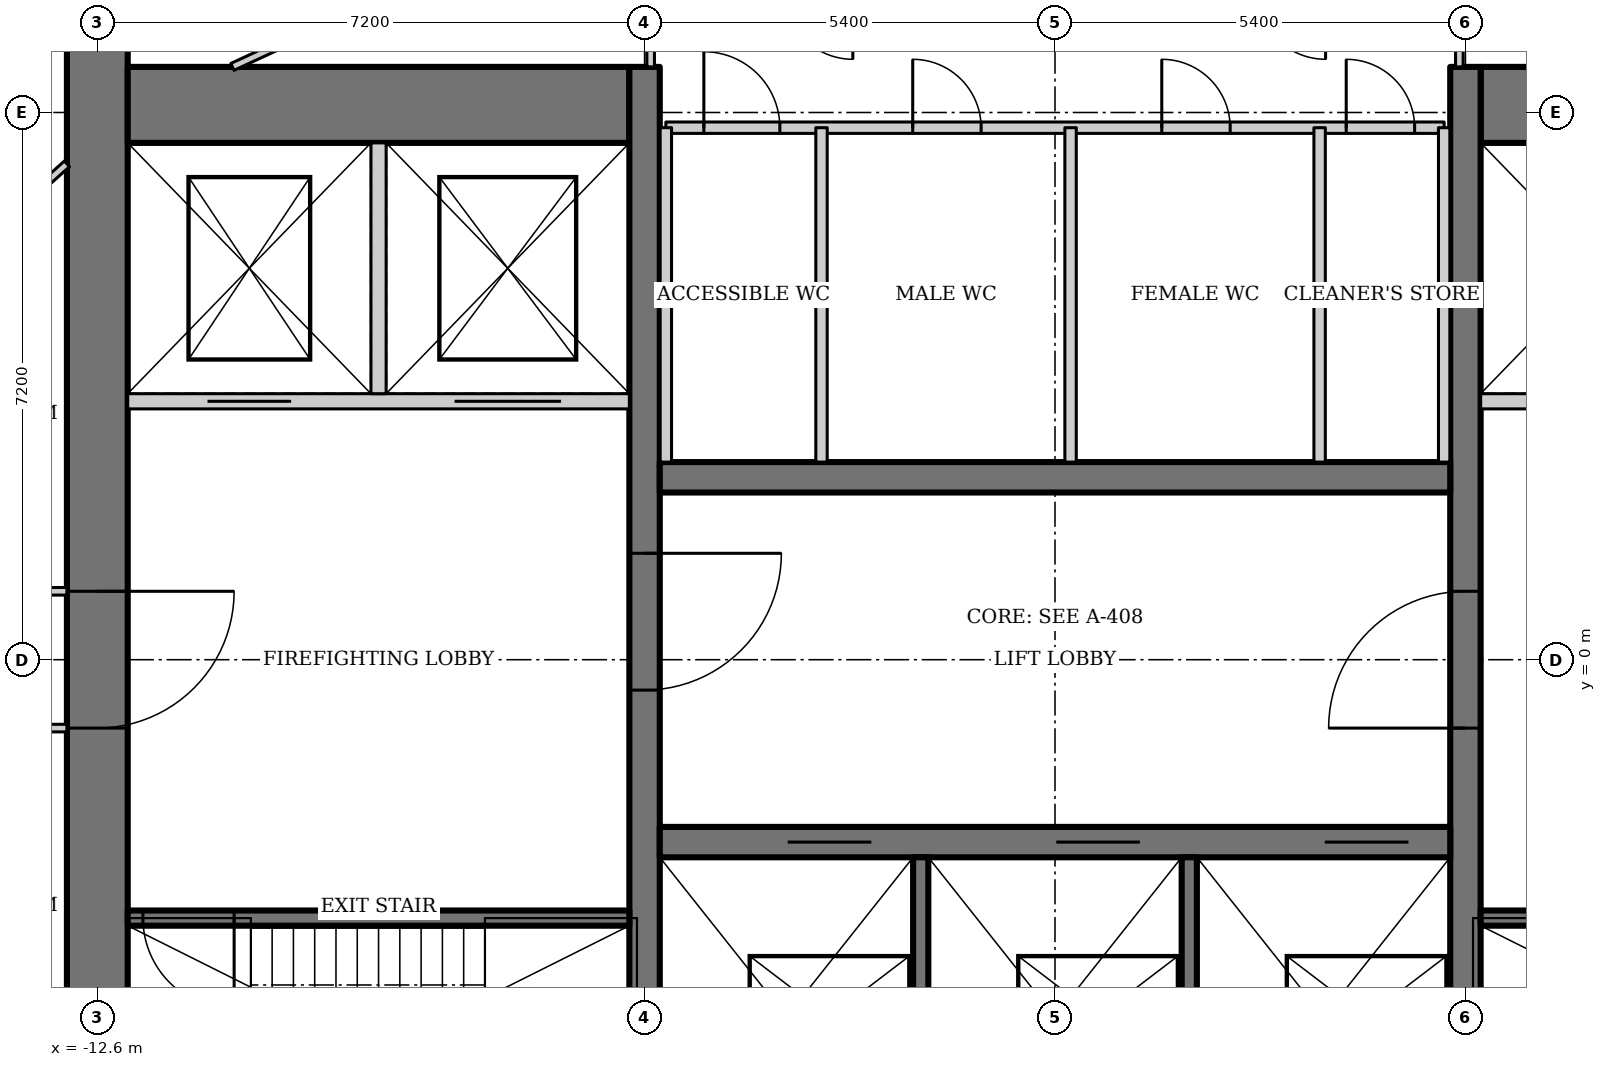
"""IFC4 building model, lengths in metres.
Left out: names, types, materials, properties, quantities, classifications, styles, units other than length and angle.
Written with IfcOpenShell. Run it as: python <this file> out.ifc"""

import sys

from ifc_helpers import new_model, si_unit, direction, frame, frame_2d, origin, place, context, subcontext, project, spatial, rectangle, extrude, element, fill, save


model = new_model("IFC4")
c1 = context("Model", 3, precision=1e-05, world=origin(), true_north=direction((0.0, 1.0)))
c2 = subcontext(c1, "Body", "Model", "MODEL_VIEW")
j1 = project(units=[si_unit("LENGTHUNIT", "METRE"), si_unit("PLANEANGLEUNIT", "RADIAN")], contexts=[c1])
p1 = place(None, origin())
s1 = spatial("IfcSite", under=j1, at=p1, CompositionType="ELEMENT")
p2 = place(p1, origin())
s2 = spatial("IfcBuilding", under=s1, at=p2, CompositionType="ELEMENT")
p3 = place(p2, frame((0.0, 0.0, 215.8)))
s3 = spatial("IfcBuildingStorey", under=s2, at=p3, CompositionType="ELEMENT", Elevation=215.8)
p4 = place(p3, frame((-12.6, 13.0, 0.0), z_axis=(0.0, 0.0, 1.0), x_axis=(0.0, -1.0, 0.0)))
e1 = element("IfcWall", 1, at=p4, inside=s3, PredefinedType="SHEAR", context=c2, shape_type="SweptSolid", body=[
    extrude(rectangle(XDim=26.0, YDim=0.8, at=frame_2d((13.0, 0.0))), origin(), (0.0, 0.0, 1.0), 4.2),
])
p5 = place(p4, frame((12.1, 0.0, 0.0)))
e2 = element("IfcOpeningElement", 2, at=p5, cuts=e1, PredefinedType="OPENING", context=c2, shape_type="SweptSolid", body=[
    extrude(rectangle(XDim=1.8, YDim=2.1, at=frame_2d((0.9, 1.05))), frame((0.0, 0.41, 0.0), z_axis=(0.0, -1.0, 0.0), x_axis=(1.0, 0.0, 0.0)), (0.0, 0.0, 1.0), 0.82),
])
for number, where, z_axis, x_axis in (
    (3, (12.2, 7.3, 0.0), (0.0, 0.0, 1.0), (-1.0, 0.0, 0.0)),
    (4, (-5.6, 7.3, 0.0), (0.0, 0.0, 1.0), (-1.0, 0.0, 0.0)),
):
    element("IfcWall", number, at=place(p3, frame(where, z_axis=z_axis, x_axis=x_axis)), inside=s3, PredefinedType="SHEAR", context=c2, shape_type="SweptSolid", body=[
        extrude(rectangle(XDim=6.6, YDim=1.0, at=frame_2d((3.3, 0.0))), origin(), (0.0, 0.0, 1.0), 4.2),
    ])
p6 = place(p3, frame((5.4, -6.8, 0.0), z_axis=(0.0, 0.0, 1.0), x_axis=(0.0, 1.0, 0.0)))
e5 = element("IfcWall", 5, at=p6, inside=s3, PredefinedType="SHEAR", context=c2, shape_type="SweptSolid", body=[
    extrude(rectangle(XDim=14.6, YDim=0.4, at=frame_2d((7.3, 0.0))), origin(), (0.0, 0.0, 1.0), 4.2),
])
p7 = place(p6, frame((5.9, 0.0, 0.0)))
e6 = element("IfcOpeningElement", 6, at=p7, cuts=e5, PredefinedType="OPENING", context=c2, shape_type="SweptSolid", body=[
    extrude(rectangle(XDim=1.8, YDim=2.1, at=frame_2d((0.9, 1.05))), frame((0.0, 0.21, 0.0), z_axis=(0.0, -1.0, 0.0), x_axis=(1.0, 0.0, 0.0)), (0.0, 0.0, 1.0), 0.42),
])
p8 = place(p3, frame((-5.4, 7.8, 0.0), z_axis=(0.0, 0.0, 1.0), x_axis=(0.0, -1.0, 0.0)))
e7 = element("IfcWall", 7, at=p8, inside=s3, PredefinedType="SHEAR", context=c2, shape_type="SweptSolid", body=[
    extrude(rectangle(XDim=14.6, YDim=0.4, at=frame_2d((7.3, 0.0))), origin(), (0.0, 0.0, 1.0), 4.2),
])
p9 = place(p8, frame((6.4, 0.0, 0.0)))
e8 = element("IfcOpeningElement", 8, at=p9, cuts=e7, PredefinedType="OPENING", context=c2, shape_type="SweptSolid", body=[
    extrude(rectangle(XDim=1.8, YDim=2.1, at=frame_2d((0.9, 1.05))), frame((0.0, 0.21, 0.0), z_axis=(0.0, -1.0, 0.0), x_axis=(1.0, 0.0, 0.0)), (0.0, 0.0, 1.0), 0.42),
])
p10 = place(p3, frame((-5.2, -2.4, 0.0), z_axis=(0.0, 0.0, 1.0), x_axis=(1.0, 0.0, 0.0)))
e9 = element("IfcWall", 9, at=p10, inside=s3, PredefinedType="SHEAR", context=c2, shape_type="SweptSolid", body=[
    extrude(rectangle(XDim=10.4, YDim=0.4, at=frame_2d((5.2, 0.0))), origin(), (0.0, 0.0, 1.0), 4.2),
])
p11 = place(p10, frame((1.683, 0.0, 0.0)))
e10 = element("IfcOpeningElement", 10, at=p11, cuts=e9, PredefinedType="OPENING", context=c2, shape_type="SweptSolid", body=[
    extrude(rectangle(XDim=1.1, YDim=2.2, at=frame_2d((0.55, 1.1))), frame((0.0, 0.21, 0.0), z_axis=(0.0, -1.0, 0.0), x_axis=(1.0, 0.0, 0.0)), (0.0, 0.0, 1.0), 0.42),
])
p12 = place(p10, frame((5.217, 0.0, 0.0)))
e11 = element("IfcOpeningElement", 11, at=p12, cuts=e9, PredefinedType="OPENING", context=c2, shape_type="SweptSolid", body=[
    extrude(rectangle(XDim=1.1, YDim=2.2, at=frame_2d((0.55, 1.1))), frame((0.0, 0.21, 0.0), z_axis=(0.0, -1.0, 0.0), x_axis=(1.0, 0.0, 0.0)), (0.0, 0.0, 1.0), 0.42),
])
p13 = place(p10, frame((8.75, 0.0, 0.0)))
e12 = element("IfcOpeningElement", 12, at=p13, cuts=e9, PredefinedType="OPENING", context=c2, shape_type="SweptSolid", body=[
    extrude(rectangle(XDim=1.1, YDim=2.2, at=frame_2d((0.55, 1.1))), frame((0.0, 0.21, 0.0), z_axis=(0.0, -1.0, 0.0), x_axis=(1.0, 0.0, 0.0)), (0.0, 0.0, 1.0), 0.42),
])
for number, where, z_axis, x_axis in (
    (13, (-1.767, -2.6, 0.0), (0.0, 0.0, 1.0), (0.0, -1.0, 0.0)),
    (14, (1.767, -2.6, 0.0), (0.0, 0.0, 1.0), (0.0, -1.0, 0.0)),
):
    element("IfcWall", number, at=place(p3, frame(where, z_axis=z_axis, x_axis=x_axis)), inside=s3, PredefinedType="SOLIDWALL", context=c2, shape_type="SweptSolid", body=[
        extrude(rectangle(XDim=4.2, YDim=0.2, at=frame_2d((2.1, 0.0))), origin(), (0.0, 0.0, 1.0), 4.2),
    ])
p14 = place(p3, frame((5.2, 2.4, 0.0), z_axis=(0.0, 0.0, 1.0), x_axis=(-1.0, 0.0, 0.0)))
e15 = element("IfcWall", 15, at=p14, inside=s3, PredefinedType="SHEAR", context=c2, shape_type="SweptSolid", body=[
    extrude(rectangle(XDim=10.4, YDim=0.4, at=frame_2d((5.2, 0.0))), origin(), (0.0, 0.0, 1.0), 4.2),
])
p15 = place(p3, frame((5.6, -3.4, 0.0), z_axis=(0.0, 0.0, 1.0), x_axis=(1.0, 0.0, 0.0)))
e16 = element("IfcWall", 16, at=p15, inside=s3, PredefinedType="SHEAR", context=c2, shape_type="SweptSolid", body=[
    extrude(rectangle(XDim=6.6, YDim=0.2, at=frame_2d((3.3, 0.0))), origin(), (0.0, 0.0, 1.0), 4.2),
])
p16 = place(p15, frame((5.2, 0.0, 0.0)))
e17 = element("IfcOpeningElement", 17, at=p16, cuts=e16, PredefinedType="OPENING", context=c2, shape_type="SweptSolid", body=[
    extrude(rectangle(XDim=1.2, YDim=2.1, at=frame_2d((0.6, 1.05))), frame((0.0, 0.11, 0.0), z_axis=(0.0, -1.0, 0.0), x_axis=(1.0, 0.0, 0.0)), (0.0, 0.0, 1.0), 0.22),
])
p17 = place(p3, frame((12.2, 3.4, 0.0), z_axis=(0.0, 0.0, 1.0), x_axis=(-1.0, 0.0, 0.0)))
e18 = element("IfcWall", 18, at=p17, inside=s3, PredefinedType="SOLIDWALL", context=c2, shape_type="SweptSolid", body=[
    extrude(rectangle(XDim=6.6, YDim=0.2, at=frame_2d((3.3, 0.0))), origin(), (0.0, 0.0, 1.0), 4.2),
])
p18 = place(p17, frame((4.45, 0.0, 0.0)))
e19 = element("IfcOpeningElement", 19, at=p18, cuts=e18, PredefinedType="OPENING", context=c2, shape_type="SweptSolid", body=[
    extrude(rectangle(XDim=1.1, YDim=2.2, at=frame_2d((0.55, 1.1))), frame((0.0, 0.11, 0.0), z_axis=(0.0, -1.0, 0.0), x_axis=(1.0, 0.0, 0.0)), (0.0, 0.0, 1.0), 0.22),
])
p19 = place(p17, frame((0.9, 0.0, 0.0)))
e20 = element("IfcOpeningElement", 20, at=p19, cuts=e18, PredefinedType="OPENING", context=c2, shape_type="SweptSolid", body=[
    extrude(rectangle(XDim=1.4, YDim=2.2, at=frame_2d((0.7, 1.1))), frame((0.0, 0.11, 0.0), z_axis=(0.0, -1.0, 0.0), x_axis=(1.0, 0.0, 0.0)), (0.0, 0.0, 1.0), 0.22),
])
p20 = place(p3, frame((-5.6, -3.4, 0.0), z_axis=(0.0, 0.0, 1.0), x_axis=(-1.0, 0.0, 0.0)))
e21 = element("IfcWall", 21, at=p20, inside=s3, PredefinedType="SHEAR", context=c2, shape_type="SweptSolid", body=[
    extrude(rectangle(XDim=6.6, YDim=0.2, at=frame_2d((3.3, 0.0))), origin(), (0.0, 0.0, 1.0), 4.2),
])
p21 = place(p20, frame((5.2, 0.0, 0.0)))
e22 = element("IfcOpeningElement", 22, at=p21, cuts=e21, PredefinedType="OPENING", context=c2, shape_type="SweptSolid", body=[
    extrude(rectangle(XDim=1.2, YDim=2.1, at=frame_2d((0.6, 1.05))), frame((0.0, 0.11, 0.0), z_axis=(0.0, -1.0, 0.0), x_axis=(1.0, 0.0, 0.0)), (0.0, 0.0, 1.0), 0.22),
])
p22 = place(p3, frame((-12.2, 3.4, 0.0), z_axis=(0.0, 0.0, 1.0), x_axis=(1.0, 0.0, 0.0)))
e23 = element("IfcWall", 23, at=p22, inside=s3, PredefinedType="SOLIDWALL", context=c2, shape_type="SweptSolid", body=[
    extrude(rectangle(XDim=6.6, YDim=0.2, at=frame_2d((3.3, 0.0))), origin(), (0.0, 0.0, 1.0), 4.2),
])
p23 = place(p22, frame((1.05, 0.0, 0.0)))
e24 = element("IfcOpeningElement", 24, at=p23, cuts=e23, PredefinedType="OPENING", context=c2, shape_type="SweptSolid", body=[
    extrude(rectangle(XDim=1.1, YDim=2.2, at=frame_2d((0.55, 1.1))), frame((0.0, 0.11, 0.0), z_axis=(0.0, -1.0, 0.0), x_axis=(1.0, 0.0, 0.0)), (0.0, 0.0, 1.0), 0.22),
])
p24 = place(p22, frame((4.3, 0.0, 0.0)))
e25 = element("IfcOpeningElement", 25, at=p24, cuts=e23, PredefinedType="OPENING", context=c2, shape_type="SweptSolid", body=[
    extrude(rectangle(XDim=1.4, YDim=2.2, at=frame_2d((0.7, 1.1))), frame((0.0, 0.11, 0.0), z_axis=(0.0, -1.0, 0.0), x_axis=(1.0, 0.0, 0.0)), (0.0, 0.0, 1.0), 0.22),
])
p25 = place(p3, frame((-8.9, 3.5, 0.0), z_axis=(0.0, 0.0, 1.0), x_axis=(0.0, 1.0, 0.0)))
e26 = element("IfcWall", 26, at=p25, inside=s3, PredefinedType="SOLIDWALL", context=c2, shape_type="SweptSolid", body=[
    extrude(rectangle(XDim=3.3, YDim=0.2, at=frame_2d((1.65, 0.0))), origin(), (0.0, 0.0, 1.0), 4.2),
])
p26 = place(p3, frame((-9.893, 10.245, 0.0), z_axis=(0.0, 0.0, 1.0), x_axis=(-0.886174439647, -0.463351769735, 0.0)))
e27 = element("IfcWall", 27, at=p26, inside=s3, PredefinedType="PARTITIONING", context=c2, shape_type="SweptSolid", body=[
    extrude(rectangle(XDim=4.735, YDim=0.15, at=frame_2d((2.367, 0.0))), origin(), (0.0, 0.0, 1.0), 4.05),
])
p27 = place(p3, frame((-5.12, 7.0, 0.0), z_axis=(0.0, 0.0, 1.0), x_axis=(1.0, 0.0, 0.0)))
e28 = element("IfcWall", 28, at=p27, inside=s3, PredefinedType="SOLIDWALL", context=c2, shape_type="SweptSolid", body=[
    extrude(rectangle(XDim=10.24, YDim=0.15, at=frame_2d((5.12, 0.0))), origin(), (0.0, 0.0, 1.0), 4.05),
])
p28 = place(p27, frame((0.5, 0.0, 0.0)))
e29 = element("IfcOpeningElement", 29, at=p28, cuts=e28, PredefinedType="OPENING", context=c2, shape_type="SweptSolid", body=[
    extrude(rectangle(XDim=1.0, YDim=2.1, at=frame_2d((0.5, 1.05))), frame((0.0, 0.085, 0.0), z_axis=(0.0, -1.0, 0.0), x_axis=(1.0, 0.0, 0.0)), (0.0, 0.0, 1.0), 0.17),
])
p29 = place(p27, frame((3.248, 0.0, 0.0)))
e30 = element("IfcOpeningElement", 30, at=p29, cuts=e28, PredefinedType="OPENING", context=c2, shape_type="SweptSolid", body=[
    extrude(rectangle(XDim=0.9, YDim=2.1, at=frame_2d((0.45, 1.05))), frame((0.0, 0.085, 0.0), z_axis=(0.0, -1.0, 0.0), x_axis=(1.0, 0.0, 0.0)), (0.0, 0.0, 1.0), 0.17),
])
p30 = place(p27, frame((6.525, 0.0, 0.0)))
e31 = element("IfcOpeningElement", 31, at=p30, cuts=e28, PredefinedType="OPENING", context=c2, shape_type="SweptSolid", body=[
    extrude(rectangle(XDim=0.9, YDim=2.1, at=frame_2d((0.45, 1.05))), frame((0.0, 0.085, 0.0), z_axis=(0.0, -1.0, 0.0), x_axis=(1.0, 0.0, 0.0)), (0.0, 0.0, 1.0), 0.17),
])
p31 = place(p27, frame((8.952, 0.0, 0.0)))
e32 = element("IfcOpeningElement", 32, at=p31, cuts=e28, PredefinedType="OPENING", context=c2, shape_type="SweptSolid", body=[
    extrude(rectangle(XDim=0.9, YDim=2.1, at=frame_2d((0.45, 1.05))), frame((0.0, 0.085, 0.0), z_axis=(0.0, -1.0, 0.0), x_axis=(1.0, 0.0, 0.0)), (0.0, 0.0, 1.0), 0.17),
])
for number, where, z_axis, x_axis in (
    (33, (-5.12, 2.6, 0.0), (0.0, 0.0, 1.0), (0.0, 1.0, 0.0)),
    (34, (5.12, 2.6, 0.0), (0.0, 0.0, 1.0), (0.0, 1.0, 0.0)),
    (35, (-3.072, 2.6, 0.0), (0.0, 0.0, 1.0), (0.0, 1.0, 0.0)),
    (36, (0.205, 2.6, 0.0), (0.0, 0.0, 1.0), (0.0, 1.0, 0.0)),
    (37, (3.482, 2.6, 0.0), (0.0, 0.0, 1.0), (0.0, 1.0, 0.0)),
):
    element("IfcWall", number, at=place(p3, frame(where, z_axis=z_axis, x_axis=x_axis)), inside=s3, PredefinedType="SOLIDWALL", context=c2, shape_type="SweptSolid", body=[
        extrude(rectangle(XDim=4.4, YDim=0.15, at=frame_2d((2.2, 0.0))), origin(), (0.0, 0.0, 1.0), 4.05),
    ])
p32 = place(p3, frame((-13.0, -6.524, 0.0), z_axis=(0.0, 0.0, 1.0), x_axis=(-0.743177243228, 0.669094601046, 0.0)))
e38 = element("IfcWall", 38, at=p32, inside=s3, PredefinedType="PARTITIONING", context=c2, shape_type="SweptSolid", body=[
    extrude(rectangle(XDim=3.843, YDim=0.1, at=frame_2d((1.921, 0.0))), origin(), (0.0, 0.0, 1.0), 4.05),
])
p33 = place(p3, frame((5.32, 7.8, 0.0), z_axis=(0.0, 0.0, 1.0), x_axis=(0.0, 1.0, 0.0)))
e39 = element("IfcWall", 39, at=p33, inside=s3, PredefinedType="PARTITIONING", context=c2, shape_type="SweptSolid", body=[
    extrude(rectangle(XDim=1.0, YDim=0.1, at=frame_2d((0.5, 0.0))), origin(), (0.0, 0.0, 1.0), 4.05),
])
p34 = place(p3, frame((-10.823, 7.8, 0.0), z_axis=(0.0, 0.0, 1.0), x_axis=(0.907759689292, 0.419490579748, 0.0)))
e40 = element("IfcWall", 40, at=p34, inside=s3, PredefinedType="PARTITIONING", context=c2, shape_type="SweptSolid", body=[
    extrude(rectangle(XDim=2.506, YDim=0.1, at=frame_2d((1.253, 0.0))), origin(), (0.0, 0.0, 1.0), 4.05),
])
p35 = place(p3, frame((-5.32, 8.8, 0.0), z_axis=(0.0, 0.0, 1.0), x_axis=(0.0, -1.0, 0.0)))
e41 = element("IfcWall", 41, at=p35, inside=s3, PredefinedType="PARTITIONING", context=c2, shape_type="SweptSolid", body=[
    extrude(rectangle(XDim=1.0, YDim=0.1, at=frame_2d((0.5, 0.0))), origin(), (0.0, 0.0, 1.0), 4.05),
])
p36 = place(p3, frame((-15.856, 3.953, 0.0), z_axis=(0.0, 0.0, 1.0), x_axis=(0.743177243228, 0.669094601046, 0.0)))
e42 = element("IfcWall", 42, at=p36, inside=s3, PredefinedType="PARTITIONING", context=c2, shape_type="SweptSolid", body=[
    extrude(rectangle(XDim=3.843, YDim=0.1, at=frame_2d((1.921, 0.0))), origin(), (0.0, 0.0, 1.0), 4.05),
])
p37 = place(p3, frame((-15.165, -0.9, 0.0), z_axis=(0.0, 0.0, 1.0), x_axis=(1.0, 0.0, 0.0)))
e43 = element("IfcWall", 43, at=p37, inside=s3, PredefinedType="PARTITIONING", context=c2, shape_type="SweptSolid", body=[
    extrude(rectangle(XDim=2.165, YDim=0.1, at=frame_2d((1.083, 0.0))), origin(), (0.0, 0.0, 1.0), 4.05),
])
p38 = place(p37, frame((0.1, 0.0, 0.0)))
e44 = element("IfcOpeningElement", 44, at=p38, cuts=e43, PredefinedType="OPENING", context=c2, shape_type="SweptSolid", body=[
    extrude(rectangle(XDim=0.9, YDim=2.1, at=frame_2d((0.45, 1.05))), frame((0.0, 0.06, 0.0), z_axis=(0.0, -1.0, 0.0), x_axis=(1.0, 0.0, 0.0)), (0.0, 0.0, 1.0), 0.12),
])
p39 = place(p3, frame((-13.0, 0.9, 0.0), z_axis=(0.0, 0.0, 1.0), x_axis=(-1.0, 0.0, 0.0)))
e45 = element("IfcWall", 45, at=p39, inside=s3, PredefinedType="PARTITIONING", context=c2, shape_type="SweptSolid", body=[
    extrude(rectangle(XDim=2.165, YDim=0.1, at=frame_2d((1.083, 0.0))), origin(), (0.0, 0.0, 1.0), 4.05),
])
p40 = place(p39, frame((1.15, 0.0, 0.0)))
e46 = element("IfcOpeningElement", 46, at=p40, cuts=e45, PredefinedType="OPENING", context=c2, shape_type="SweptSolid", body=[
    extrude(rectangle(XDim=0.9, YDim=2.1, at=frame_2d((0.45, 1.05))), frame((0.0, 0.06, 0.0), z_axis=(0.0, -1.0, 0.0), x_axis=(1.0, 0.0, 0.0)), (0.0, 0.0, 1.0), 0.12),
])
p41 = place(p7, origin())
e47 = element("IfcDoor", 47, at=p41, inside=s3, OperationType="DOUBLE_DOOR_DOUBLE_SWING", PredefinedType="DOOR", context=c2, shape_type="SweptSolid", body=[
    extrude(rectangle(XDim=1.8, YDim=2.1, at=frame_2d((0.9, 1.05))), frame((0.0, 0.025, 0.0), z_axis=(0.0, -1.0, 0.0), x_axis=(1.0, 0.0, 0.0)), (0.0, 0.0, 1.0), 0.05),
])
fill(e6, e47)
p42 = place(p9, origin())
e48 = element("IfcDoor", 48, at=p42, inside=s3, OperationType="DOUBLE_DOOR_DOUBLE_SWING", PredefinedType="DOOR", context=c2, shape_type="SweptSolid", body=[
    extrude(rectangle(XDim=1.8, YDim=2.1, at=frame_2d((0.9, 1.05))), frame((0.0, 0.025, 0.0), z_axis=(0.0, -1.0, 0.0), x_axis=(1.0, 0.0, 0.0)), (0.0, 0.0, 1.0), 0.05),
])
fill(e8, e48)
p43 = place(p21, origin())
e49 = element("IfcDoor", 49, at=p43, inside=s3, OperationType="SINGLE_SWING_RIGHT", PredefinedType="DOOR", context=c2, shape_type="SweptSolid", body=[
    extrude(rectangle(XDim=1.2, YDim=2.1, at=frame_2d((0.6, 1.05))), frame((0.0, 0.025, 0.0), z_axis=(0.0, -1.0, 0.0), x_axis=(1.0, 0.0, 0.0)), (0.0, 0.0, 1.0), 0.05),
])
fill(e22, e49)
p44 = place(p5, origin())
e50 = element("IfcDoor", 50, at=p44, inside=s3, OperationType="DOUBLE_DOOR_DOUBLE_SWING", PredefinedType="DOOR", context=c2, shape_type="SweptSolid", body=[
    extrude(rectangle(XDim=1.8, YDim=2.1, at=frame_2d((0.9, 1.05))), frame((0.0, 0.025, 0.0), z_axis=(0.0, -1.0, 0.0), x_axis=(1.0, 0.0, 0.0)), (0.0, 0.0, 1.0), 0.05),
])
fill(e2, e50)
p45 = place(p11, origin())
e51 = element("IfcDoor", 51, at=p45, inside=s3, OperationType="DOUBLE_DOOR_SLIDING", PredefinedType="DOOR", context=c2, shape_type="SweptSolid", body=[
    extrude(rectangle(XDim=1.1, YDim=2.2, at=frame_2d((0.55, 1.1))), frame((0.0, 0.025, 0.0), z_axis=(0.0, -1.0, 0.0), x_axis=(1.0, 0.0, 0.0)), (0.0, 0.0, 1.0), 0.05),
])
fill(e10, e51)
p46 = place(p12, origin())
e52 = element("IfcDoor", 52, at=p46, inside=s3, OperationType="DOUBLE_DOOR_SLIDING", PredefinedType="DOOR", context=c2, shape_type="SweptSolid", body=[
    extrude(rectangle(XDim=1.1, YDim=2.2, at=frame_2d((0.55, 1.1))), frame((0.0, 0.025, 0.0), z_axis=(0.0, -1.0, 0.0), x_axis=(1.0, 0.0, 0.0)), (0.0, 0.0, 1.0), 0.05),
])
fill(e11, e52)
p47 = place(p13, origin())
e53 = element("IfcDoor", 53, at=p47, inside=s3, OperationType="DOUBLE_DOOR_SLIDING", PredefinedType="DOOR", context=c2, shape_type="SweptSolid", body=[
    extrude(rectangle(XDim=1.1, YDim=2.2, at=frame_2d((0.55, 1.1))), frame((0.0, 0.025, 0.0), z_axis=(0.0, -1.0, 0.0), x_axis=(1.0, 0.0, 0.0)), (0.0, 0.0, 1.0), 0.05),
])
fill(e12, e53)
p48 = place(p23, origin())
e54 = element("IfcDoor", 54, at=p48, inside=s3, OperationType="DOUBLE_DOOR_SLIDING", PredefinedType="DOOR", context=c2, shape_type="SweptSolid", body=[
    extrude(rectangle(XDim=1.1, YDim=2.2, at=frame_2d((0.55, 1.1))), frame((0.0, 0.025, 0.0), z_axis=(0.0, -1.0, 0.0), x_axis=(1.0, 0.0, 0.0)), (0.0, 0.0, 1.0), 0.05),
])
fill(e24, e54)
p49 = place(p24, origin())
e55 = element("IfcDoor", 55, at=p49, inside=s3, OperationType="DOUBLE_DOOR_SLIDING", PredefinedType="DOOR", context=c2, shape_type="SweptSolid", body=[
    extrude(rectangle(XDim=1.4, YDim=2.2, at=frame_2d((0.7, 1.1))), frame((0.0, 0.025, 0.0), z_axis=(0.0, -1.0, 0.0), x_axis=(1.0, 0.0, 0.0)), (0.0, 0.0, 1.0), 0.05),
])
fill(e25, e55)
p50 = place(p28, origin())
e56 = element("IfcDoor", 56, at=p50, inside=s3, OperationType="SINGLE_SWING_LEFT", PredefinedType="DOOR", context=c2, shape_type="SweptSolid", body=[
    extrude(rectangle(XDim=1.0, YDim=2.1, at=frame_2d((0.5, 1.05))), frame((0.0, 0.025, 0.0), z_axis=(0.0, -1.0, 0.0), x_axis=(1.0, 0.0, 0.0)), (0.0, 0.0, 1.0), 0.05),
])
fill(e29, e56)
p51 = place(p29, origin())
e57 = element("IfcDoor", 57, at=p51, inside=s3, OperationType="SINGLE_SWING_LEFT", PredefinedType="DOOR", context=c2, shape_type="SweptSolid", body=[
    extrude(rectangle(XDim=0.9, YDim=2.1, at=frame_2d((0.45, 1.05))), frame((0.0, 0.025, 0.0), z_axis=(0.0, -1.0, 0.0), x_axis=(1.0, 0.0, 0.0)), (0.0, 0.0, 1.0), 0.05),
])
fill(e30, e57)
p52 = place(p30, origin())
e58 = element("IfcDoor", 58, at=p52, inside=s3, OperationType="SINGLE_SWING_LEFT", PredefinedType="DOOR", context=c2, shape_type="SweptSolid", body=[
    extrude(rectangle(XDim=0.9, YDim=2.1, at=frame_2d((0.45, 1.05))), frame((0.0, 0.025, 0.0), z_axis=(0.0, -1.0, 0.0), x_axis=(1.0, 0.0, 0.0)), (0.0, 0.0, 1.0), 0.05),
])
fill(e31, e58)
p53 = place(p31, origin())
e59 = element("IfcDoor", 59, at=p53, inside=s3, OperationType="SINGLE_SWING_LEFT", PredefinedType="DOOR", context=c2, shape_type="SweptSolid", body=[
    extrude(rectangle(XDim=0.9, YDim=2.1, at=frame_2d((0.45, 1.05))), frame((0.0, 0.025, 0.0), z_axis=(0.0, -1.0, 0.0), x_axis=(1.0, 0.0, 0.0)), (0.0, 0.0, 1.0), 0.05),
])
fill(e32, e59)
save(model, sys.argv[1])
